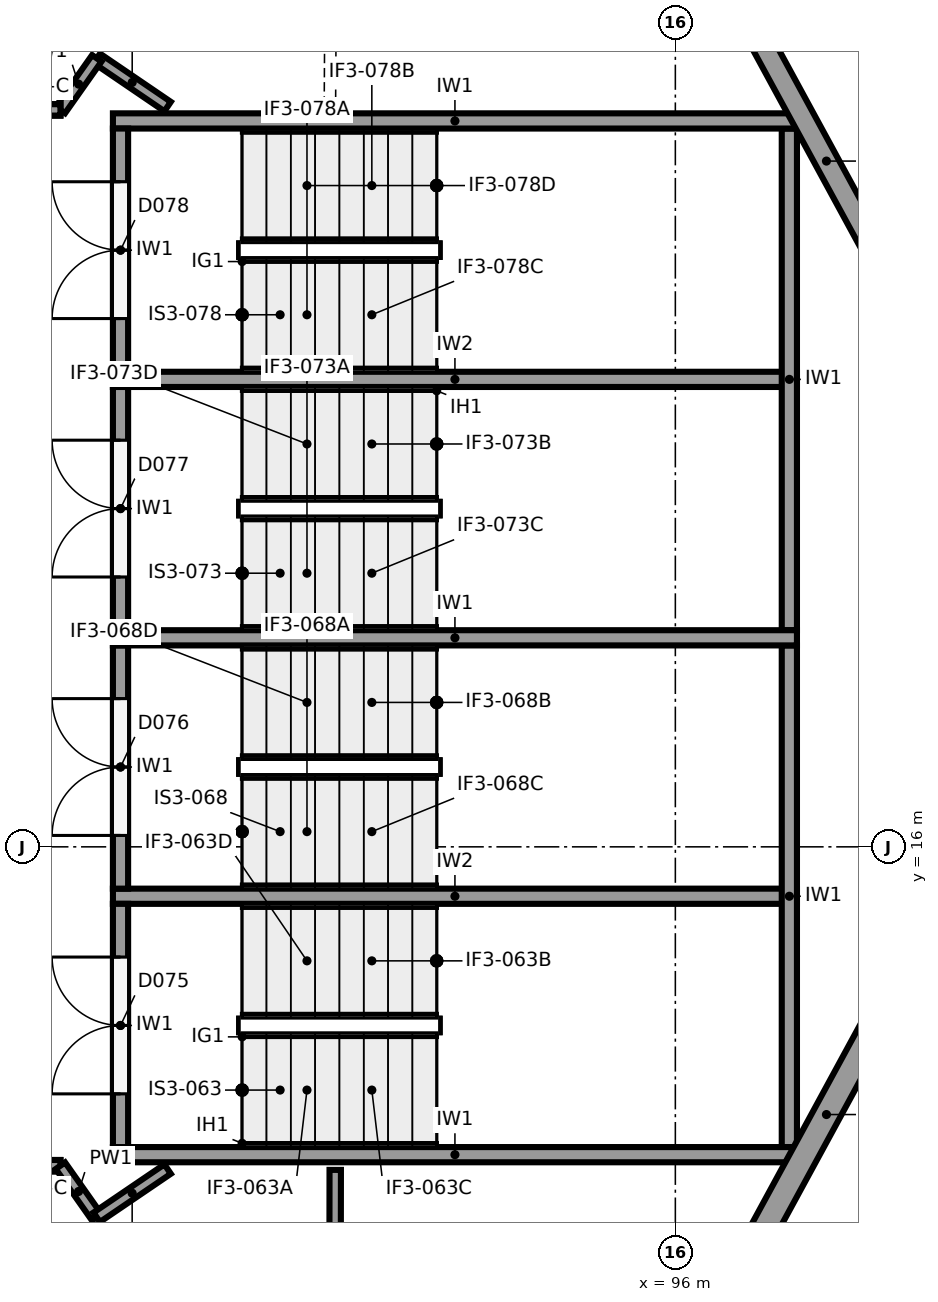
"""IFC4 building model, lengths in metres.
Left out: names, types, materials, properties, quantities, classifications, styles, units other than length and angle.
Written with IfcOpenShell. Run it as: python <this file> out.ifc"""

import sys

from ifc_helpers import new_model, si_unit, direction, frame, frame_2d, origin, place, context, subcontext, project, spatial, rectangle, extrude, element, fill, save


model = new_model("IFC4")
c1 = context("Model", 3, precision=1e-05, world=origin(), true_north=direction((0.0, 1.0)))
c2 = subcontext(c1, "Body", "Model", "MODEL_VIEW")
j1 = project(units=[si_unit("LENGTHUNIT", "METRE"), si_unit("PLANEANGLEUNIT", "RADIAN")], contexts=[c1])
p1 = place(None, origin())
s1 = spatial("IfcSite", under=j1, at=p1, CompositionType="ELEMENT")
p2 = place(p1, origin())
s2 = spatial("IfcBuilding", under=s1, at=p2, CompositionType="ELEMENT")
p3 = place(p2, frame((0.0, 0.0, 6.5)))
s3 = spatial("IfcBuildingStorey", under=s2, at=p3, CompositionType="ELEMENT", Elevation=6.5)
p4 = place(p3, frame((101.161, 18.311, 0.0), z_axis=(0.0, 0.0, 1.0), x_axis=(-0.477867771117, -0.878431780691, 0.0)))
e1 = element("IfcWall", 1, at=p4, inside=s3, PredefinedType="SOLIDWALL", context=c2, shape_type="SweptSolid", body=[
    extrude(rectangle(XDim=13.28, YDim=0.35, at=frame_2d((6.64, 0.0))), origin(), (0.0, 0.0, 1.0), 3.85),
])
p5 = place(p4, frame((8.93, 0.0, 0.0)))
e2 = element("IfcOpeningElement", 2, at=p5, cuts=e1, PredefinedType="OPENING", context=c2, shape_type="SweptSolid", body=[
    extrude(rectangle(XDim=2.4, YDim=2.8, at=frame_2d((1.2, 1.4))), frame((0.0, 0.185, 0.0), z_axis=(0.0, -1.0, 0.0), x_axis=(1.0, 0.0, 0.0)), (0.0, 0.0, 1.0), 0.37),
])
p6 = place(p3, frame((94.815, 30.855, 0.0), z_axis=(0.0, 0.0, 1.0), x_axis=(0.477867771117, -0.878431780691, 0.0)))
e3 = element("IfcWall", 3, at=p6, inside=s3, PredefinedType="SOLIDWALL", context=c2, shape_type="SweptSolid", body=[
    extrude(rectangle(XDim=13.28, YDim=0.3, at=frame_2d((6.64, 0.0))), origin(), (0.0, 0.0, 1.0), 3.85),
])
for number, where, z_axis, x_axis in (
    (4, (97.6, 11.95, 0.0), (0.0, 0.0, 1.0), (-1.0, 0.0, 0.0)),
    (5, (97.6, 18.75, 0.0), (0.0, 0.0, 1.0), (-1.0, 0.0, 0.0)),
    (6, (97.6, 25.55, 0.0), (0.0, 0.0, 1.0), (-1.0, 0.0, 0.0)),
):
    element("IfcWall", number, at=place(p3, frame(where, z_axis=z_axis, x_axis=x_axis)), inside=s3, PredefinedType="SHEAR", context=c2, shape_type="SweptSolid", body=[
        extrude(rectangle(XDim=9.0, YDim=0.2, at=frame_2d((4.5, 0.0))), origin(), (0.0, 0.0, 1.0), 5.15),
    ])
for number, where, z_axis, x_axis in (
    (7, (97.5, 12.05, 0.0), (0.0, 0.0, 1.0), (0.0, 1.0, 0.0)),
    (8, (97.5, 18.85, 0.0), (0.0, 0.0, 1.0), (0.0, 1.0, 0.0)),
):
    element("IfcWall", number, at=place(p3, frame(where, z_axis=z_axis, x_axis=x_axis)), inside=s3, PredefinedType="SHEAR", context=c2, shape_type="SweptSolid", body=[
        extrude(rectangle(XDim=6.6, YDim=0.2, at=frame_2d((3.3, 0.0))), origin(), (0.0, 0.0, 1.0), 5.15),
    ])
for number, where, z_axis, x_axis in (
    (9, (97.6, 15.35, 0.0), (0.0, 0.0, 1.0), (-1.0, 0.0, 0.0)),
    (10, (97.6, 22.15, 0.0), (0.0, 0.0, 1.0), (-1.0, 0.0, 0.0)),
):
    element("IfcWall", number, at=place(p3, frame(where, z_axis=z_axis, x_axis=x_axis)), inside=s3, PredefinedType="SHEAR", context=c2, shape_type="SweptSolid", body=[
        extrude(rectangle(XDim=9.0, YDim=0.2, at=frame_2d((4.5, 0.0))), origin(), (0.0, 0.0, 1.0), 5.15),
    ])
p7 = place(p3, frame((88.7, 12.05, 0.0), z_axis=(0.0, 0.0, 1.0), x_axis=(0.0, 1.0, 0.0)))
e11 = element("IfcWall", 11, at=p7, inside=s3, PredefinedType="SHEAR", context=c2, shape_type="SweptSolid", body=[
    extrude(rectangle(XDim=3.2, YDim=0.2, at=frame_2d((1.6, 0.0))), origin(), (0.0, 0.0, 1.0), 5.15),
])
p8 = place(p7, frame((0.7, 0.0, 0.0)))
e12 = element("IfcOpeningElement", 12, at=p8, cuts=e11, PredefinedType="OPENING", context=c2, shape_type="SweptSolid", body=[
    extrude(rectangle(XDim=1.8, YDim=2.1, at=frame_2d((0.9, 1.05))), frame((0.0, 0.11, 0.0), z_axis=(0.0, -1.0, 0.0), x_axis=(1.0, 0.0, 0.0)), (0.0, 0.0, 1.0), 0.22),
])
p9 = place(p3, frame((88.7, 15.45, 0.0), z_axis=(0.0, 0.0, 1.0), x_axis=(0.0, 1.0, 0.0)))
e13 = element("IfcWall", 13, at=p9, inside=s3, PredefinedType="SHEAR", context=c2, shape_type="SweptSolid", body=[
    extrude(rectangle(XDim=3.2, YDim=0.2, at=frame_2d((1.6, 0.0))), origin(), (0.0, 0.0, 1.0), 5.15),
])
p10 = place(p9, frame((0.7, 0.0, 0.0)))
e14 = element("IfcOpeningElement", 14, at=p10, cuts=e13, PredefinedType="OPENING", context=c2, shape_type="SweptSolid", body=[
    extrude(rectangle(XDim=1.8, YDim=2.1, at=frame_2d((0.9, 1.05))), frame((0.0, 0.11, 0.0), z_axis=(0.0, -1.0, 0.0), x_axis=(1.0, 0.0, 0.0)), (0.0, 0.0, 1.0), 0.22),
])
p11 = place(p3, frame((88.7, 18.85, 0.0), z_axis=(0.0, 0.0, 1.0), x_axis=(0.0, 1.0, 0.0)))
e15 = element("IfcWall", 15, at=p11, inside=s3, PredefinedType="SHEAR", context=c2, shape_type="SweptSolid", body=[
    extrude(rectangle(XDim=3.2, YDim=0.2, at=frame_2d((1.6, 0.0))), origin(), (0.0, 0.0, 1.0), 5.15),
])
p12 = place(p11, frame((0.7, 0.0, 0.0)))
e16 = element("IfcOpeningElement", 16, at=p12, cuts=e15, PredefinedType="OPENING", context=c2, shape_type="SweptSolid", body=[
    extrude(rectangle(XDim=1.8, YDim=2.1, at=frame_2d((0.9, 1.05))), frame((0.0, 0.11, 0.0), z_axis=(0.0, -1.0, 0.0), x_axis=(1.0, 0.0, 0.0)), (0.0, 0.0, 1.0), 0.22),
])
p13 = place(p3, frame((88.7, 22.25, 0.0), z_axis=(0.0, 0.0, 1.0), x_axis=(0.0, 1.0, 0.0)))
e17 = element("IfcWall", 17, at=p13, inside=s3, PredefinedType="SHEAR", context=c2, shape_type="SweptSolid", body=[
    extrude(rectangle(XDim=3.2, YDim=0.2, at=frame_2d((1.6, 0.0))), origin(), (0.0, 0.0, 1.0), 5.15),
])
p14 = place(p13, frame((0.7, 0.0, 0.0)))
e18 = element("IfcOpeningElement", 18, at=p14, cuts=e17, PredefinedType="OPENING", context=c2, shape_type="SweptSolid", body=[
    extrude(rectangle(XDim=1.8, YDim=2.1, at=frame_2d((0.9, 1.05))), frame((0.0, 0.11, 0.0), z_axis=(0.0, -1.0, 0.0), x_axis=(1.0, 0.0, 0.0)), (0.0, 0.0, 1.0), 0.22),
])
p15 = place(p3, frame((91.519, 6.967, 0.0), z_axis=(0.0, 0.0, 1.0), x_axis=(0.001174067593, 0.999999310782, 0.0)))
e19 = element("IfcWall", 19, at=p15, inside=s3, PredefinedType="PARTITIONING", context=c2, shape_type="SweptSolid", body=[
    extrude(rectangle(XDim=4.783, YDim=0.15, at=frame_2d((2.391, 0.0))), origin(), (0.0, 0.0, 1.0), 5.15),
])
p16 = place(p3, frame((91.455, 25.75, 0.0), z_axis=(0.0, 0.0, 1.0), x_axis=(0.006125459352, 0.999981239198, 0.0)))
e20 = element("IfcWall", 20, at=p16, inside=s3, PredefinedType="PARTITIONING", context=c2, shape_type="SweptSolid", body=[
    extrude(rectangle(XDim=4.783, YDim=0.15, at=frame_2d((2.391, 0.0))), origin(), (0.0, 0.0, 1.0), 5.15),
])
p17 = place(p16, frame((1.95, 0.0, 0.0)))
e21 = element("IfcOpeningElement", 21, at=p17, cuts=e20, PredefinedType="OPENING", context=c2, shape_type="SweptSolid", body=[
    extrude(rectangle(XDim=1.0, YDim=2.1, at=frame_2d((0.5, 1.05))), frame((0.0, 0.085, 0.0), z_axis=(0.0, -1.0, 0.0), x_axis=(1.0, 0.0, 0.0)), (0.0, 0.0, 1.0), 0.17),
])
p18 = place(p3, frame((89.32, 25.74, 0.0), z_axis=(0.0, 0.0, 1.0), x_axis=(-0.826749248939, 0.562570599462, 0.0)))
e22 = element("IfcWall", 22, at=p18, inside=s3, PredefinedType="PARTITIONING", context=c2, shape_type="SweptSolid", body=[
    extrude(rectangle(XDim=1.127, YDim=0.15, at=frame_2d((0.564, 0.0))), origin(), (0.0, 0.0, 1.0), 5.15),
])
p19 = place(p3, frame((88.388, 26.374, 0.0), z_axis=(0.0, 0.0, 1.0), x_axis=(-0.5761634622, -0.817334487726, 0.0)))
e23 = element("IfcWall", 23, at=p19, inside=s3, PredefinedType="PARTITIONING", context=c2, shape_type="SweptSolid", body=[
    extrude(rectangle(XDim=0.83, YDim=0.15, at=frame_2d((0.415, 0.0))), origin(), (0.0, 0.0, 1.0), 5.15),
])
p20 = place(p3, frame((87.909, 25.695, 0.0), z_axis=(0.0, 0.0, 1.0), x_axis=(-0.999999997827, -6.5919578e-05, 0.0)))
e24 = element("IfcWall", 24, at=p20, inside=s3, PredefinedType="PARTITIONING", context=c2, shape_type="SweptSolid", body=[
    extrude(rectangle(XDim=3.704, YDim=0.15, at=frame_2d((1.852, 0.0))), origin(), (0.0, 0.0, 1.0), 4.05),
])
p21 = place(p20, frame((0.65, 0.0, 0.0)))
e25 = element("IfcOpeningElement", 25, at=p21, cuts=e24, PredefinedType="OPENING", context=c2, shape_type="SweptSolid", body=[
    extrude(rectangle(XDim=1.8, YDim=2.1, at=frame_2d((0.9, 1.05))), frame((0.0, 0.085, 0.0), z_axis=(0.0, -1.0, 0.0), x_axis=(1.0, 0.0, 0.0)), (0.0, 0.0, 1.0), 0.17),
])
p22 = place(p3, frame((87.909, 25.695, 4.05), z_axis=(0.0, 0.0, 1.0), x_axis=(-1.0, 0.0, 0.0)))
e26 = element("IfcWall", 26, at=p22, inside=s3, PredefinedType="PARTITIONING", context=c2, shape_type="SweptSolid", body=[
    extrude(rectangle(XDim=0.6, YDim=0.15, at=frame_2d((0.3, 0.0))), origin(), (0.0, 0.0, 1.0), 1.1),
])
p23 = place(p3, frame((81.555, 11.805, 0.0), z_axis=(0.0, 0.0, 1.0), x_axis=(1.0, 0.0, 0.0)))
e27 = element("IfcWall", 27, at=p23, inside=s3, PredefinedType="PARTITIONING", context=c2, shape_type="SweptSolid", body=[
    extrude(rectangle(XDim=6.354, YDim=0.15, at=frame_2d((3.177, 0.0))), origin(), (0.0, 0.0, 1.0), 4.05),
])
p24 = place(p23, frame((3.85, 0.0, 0.0)))
e28 = element("IfcOpeningElement", 28, at=p24, cuts=e27, PredefinedType="OPENING", context=c2, shape_type="SweptSolid", body=[
    extrude(rectangle(XDim=1.8, YDim=2.1, at=frame_2d((0.9, 1.05))), frame((0.0, 0.085, 0.0), z_axis=(0.0, -1.0, 0.0), x_axis=(1.0, 0.0, 0.0)), (0.0, 0.0, 1.0), 0.17),
])
p25 = place(p3, frame((87.255, 11.805, 4.05), z_axis=(0.0, 0.0, 1.0), x_axis=(1.0, 0.0, 0.0)))
e29 = element("IfcWall", 29, at=p25, inside=s3, PredefinedType="PARTITIONING", context=c2, shape_type="SweptSolid", body=[
    extrude(rectangle(XDim=0.654, YDim=0.15, at=frame_2d((0.327, 0.0))), origin(), (0.0, 0.0, 1.0), 1.1),
])
p26 = place(p3, frame((87.909, 11.805, 0.0), z_axis=(0.0, 0.0, 1.0), x_axis=(0.575573582652, -0.81774999294, 0.0)))
e30 = element("IfcWall", 30, at=p26, inside=s3, PredefinedType="PARTITIONING", context=c2, shape_type="SweptSolid", body=[
    extrude(rectangle(XDim=0.83, YDim=0.15, at=frame_2d((0.415, 0.0))), origin(), (0.0, 0.0, 1.0), 5.15),
])
p27 = place(p3, frame((88.387, 11.126, 0.0), z_axis=(0.0, 0.0, 1.0), x_axis=(0.827055308354, 0.562120553728, 0.0)))
e31 = element("IfcWall", 31, at=p27, inside=s3, PredefinedType="PARTITIONING", context=c2, shape_type="SweptSolid", body=[
    extrude(rectangle(XDim=1.128, YDim=0.15, at=frame_2d((0.564, 0.0))), origin(), (0.0, 0.0, 1.0), 5.15),
])
p28 = place(p8, origin())
e32 = element("IfcDoor", 32, at=p28, inside=s3, OperationType="DOUBLE_DOOR_SINGLE_SWING", PredefinedType="DOOR", context=c2, shape_type="SweptSolid", body=[
    extrude(rectangle(XDim=1.8, YDim=2.1, at=frame_2d((0.9, 1.05))), frame((0.0, 0.025, 0.0), z_axis=(0.0, -1.0, 0.0), x_axis=(1.0, 0.0, 0.0)), (0.0, 0.0, 1.0), 0.05),
])
fill(e12, e32)
p29 = place(p10, origin())
e33 = element("IfcDoor", 33, at=p29, inside=s3, OperationType="DOUBLE_DOOR_SINGLE_SWING", PredefinedType="DOOR", context=c2, shape_type="SweptSolid", body=[
    extrude(rectangle(XDim=1.8, YDim=2.1, at=frame_2d((0.9, 1.05))), frame((0.0, 0.025, 0.0), z_axis=(0.0, -1.0, 0.0), x_axis=(1.0, 0.0, 0.0)), (0.0, 0.0, 1.0), 0.05),
])
fill(e14, e33)
p30 = place(p12, origin())
e34 = element("IfcDoor", 34, at=p30, inside=s3, OperationType="DOUBLE_DOOR_SINGLE_SWING", PredefinedType="DOOR", context=c2, shape_type="SweptSolid", body=[
    extrude(rectangle(XDim=1.8, YDim=2.1, at=frame_2d((0.9, 1.05))), frame((0.0, 0.025, 0.0), z_axis=(0.0, -1.0, 0.0), x_axis=(1.0, 0.0, 0.0)), (0.0, 0.0, 1.0), 0.05),
])
fill(e16, e34)
p31 = place(p14, origin())
e35 = element("IfcDoor", 35, at=p31, inside=s3, OperationType="DOUBLE_DOOR_SINGLE_SWING", PredefinedType="DOOR", context=c2, shape_type="SweptSolid", body=[
    extrude(rectangle(XDim=1.8, YDim=2.1, at=frame_2d((0.9, 1.05))), frame((0.0, 0.025, 0.0), z_axis=(0.0, -1.0, 0.0), x_axis=(1.0, 0.0, 0.0)), (0.0, 0.0, 1.0), 0.05),
])
fill(e18, e35)
save(model, sys.argv[1])
